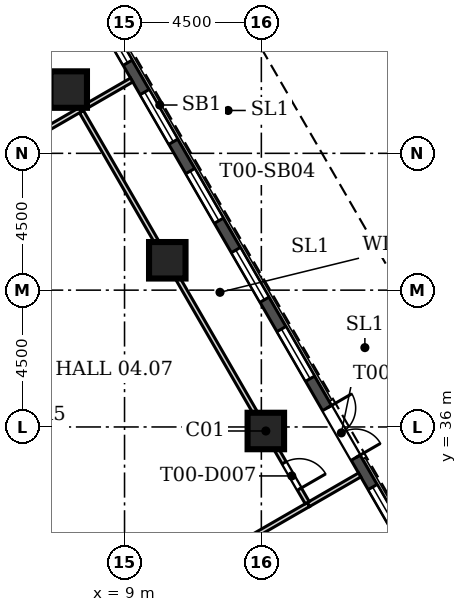
"""IFC4 building model, lengths in metres.
Left out: names, types, materials, properties, quantities, classifications, styles, units other than length and angle.
Written with IfcOpenShell. Run it as: python <this file> out.ifc"""

import sys

from ifc_helpers import new_model, si_unit, direction, frame, frame_2d, origin, origin_2d, place, context, subcontext, project, spatial, rectangle, hollow_rectangle, extrude, element, fill, save


model = new_model("IFC4")
c1 = context("Model", 3, precision=1e-05, world=origin(), true_north=direction((0.0, 1.0)))
c2 = subcontext(c1, "Body", "Model", "MODEL_VIEW")
j1 = project(units=[si_unit("LENGTHUNIT", "METRE"), si_unit("PLANEANGLEUNIT", "RADIAN")], contexts=[c1])
p1 = place(None, origin())
s1 = spatial("IfcSite", under=j1, at=p1, CompositionType="ELEMENT")
p2 = place(p1, origin())
s2 = spatial("IfcBuilding", under=s1, at=p2, CompositionType="ELEMENT")
p3 = place(p2, frame((0.0, 0.0, 25.0)))
s3 = spatial("IfcBuildingStorey", under=s2, at=p3, CompositionType="ELEMENT", Elevation=25.0)
for number, where, z_axis, x_axis in (
    (1, (13.648, 35.868, 0.0), (0.0, 0.0, 1.0), (1.0, 0.0, 0.0)),
    (2, (10.406, 41.482, 0.0), (0.0, 0.0, 1.0), (1.0, 0.0, 0.0)),
    (3, (7.164, 47.097, 0.0), (0.0, 0.0, 1.0), (1.0, 0.0, 0.0)),
):
    element("IfcColumn", number, at=place(p3, frame(where, z_axis=z_axis, x_axis=x_axis)), inside=s3, PredefinedType="COLUMN", context=c2, shape_type="SweptSolid", body=[
        extrude(rectangle(XDim=1.2, YDim=1.2, at=origin_2d()), origin(), (0.0, 0.0, 1.0), 4.5),
    ])
p4 = place(p3, frame((32.353, 7.709, 0.0), z_axis=(0.0, 0.0, 1.0), x_axis=(-0.500000836325, 0.866024920931, 0.0)))
e4 = element("IfcWall", 4, at=p4, inside=s3, PredefinedType="SOLIDWALL", context=c2, shape_type="SweptSolid", body=[
    extrude(rectangle(XDim=56.0, YDim=0.34, at=frame_2d((28.0, 0.0))), origin(), (0.0, 0.0, 1.0), 4.2),
])
p5 = place(p4, frame((1.5, 0.0, 0.9)))
e5 = element("IfcOpeningElement", 5, at=p5, cuts=e4, PredefinedType="OPENING", context=c2, shape_type="SweptSolid", body=[
    extrude(rectangle(XDim=1.885, YDim=3.0, at=frame_2d((0.942, 1.5))), frame((0.0, 0.18, 0.0), z_axis=(0.0, -1.0, 0.0), x_axis=(1.0, 0.0, 0.0)), (0.0, 0.0, 1.0), 0.36),
])
p6 = place(p4, frame((4.5, 0.0, 0.9)))
e6 = element("IfcOpeningElement", 6, at=p6, cuts=e4, PredefinedType="OPENING", context=c2, shape_type="SweptSolid", body=[
    extrude(rectangle(XDim=1.885, YDim=3.0, at=frame_2d((0.942, 1.5))), frame((0.0, 0.18, 0.0), z_axis=(0.0, -1.0, 0.0), x_axis=(1.0, 0.0, 0.0)), (0.0, 0.0, 1.0), 0.36),
])
p7 = place(p4, frame((7.5, 0.0, 0.9)))
e7 = element("IfcOpeningElement", 7, at=p7, cuts=e4, PredefinedType="OPENING", context=c2, shape_type="SweptSolid", body=[
    extrude(rectangle(XDim=1.885, YDim=3.0, at=frame_2d((0.942, 1.5))), frame((0.0, 0.18, 0.0), z_axis=(0.0, -1.0, 0.0), x_axis=(1.0, 0.0, 0.0)), (0.0, 0.0, 1.0), 0.36),
])
p8 = place(p4, frame((10.5, 0.0, 0.9)))
e8 = element("IfcOpeningElement", 8, at=p8, cuts=e4, PredefinedType="OPENING", context=c2, shape_type="SweptSolid", body=[
    extrude(rectangle(XDim=1.885, YDim=3.0, at=frame_2d((0.942, 1.5))), frame((0.0, 0.18, 0.0), z_axis=(0.0, -1.0, 0.0), x_axis=(1.0, 0.0, 0.0)), (0.0, 0.0, 1.0), 0.36),
])
p9 = place(p4, frame((13.5, 0.0, 0.9)))
e9 = element("IfcOpeningElement", 9, at=p9, cuts=e4, PredefinedType="OPENING", context=c2, shape_type="SweptSolid", body=[
    extrude(rectangle(XDim=1.885, YDim=3.0, at=frame_2d((0.942, 1.5))), frame((0.0, 0.18, 0.0), z_axis=(0.0, -1.0, 0.0), x_axis=(1.0, 0.0, 0.0)), (0.0, 0.0, 1.0), 0.36),
])
p10 = place(p4, frame((16.5, 0.0, 0.9)))
e10 = element("IfcOpeningElement", 10, at=p10, cuts=e4, PredefinedType="OPENING", context=c2, shape_type="SweptSolid", body=[
    extrude(rectangle(XDim=1.885, YDim=3.0, at=frame_2d((0.942, 1.5))), frame((0.0, 0.18, 0.0), z_axis=(0.0, -1.0, 0.0), x_axis=(1.0, 0.0, 0.0)), (0.0, 0.0, 1.0), 0.36),
])
p11 = place(p4, frame((19.5, 0.0, 0.9)))
e11 = element("IfcOpeningElement", 11, at=p11, cuts=e4, PredefinedType="OPENING", context=c2, shape_type="SweptSolid", body=[
    extrude(rectangle(XDim=1.885, YDim=3.0, at=frame_2d((0.942, 1.5))), frame((0.0, 0.18, 0.0), z_axis=(0.0, -1.0, 0.0), x_axis=(1.0, 0.0, 0.0)), (0.0, 0.0, 1.0), 0.36),
])
p12 = place(p4, frame((22.5, 0.0, 0.9)))
e12 = element("IfcOpeningElement", 12, at=p12, cuts=e4, PredefinedType="OPENING", context=c2, shape_type="SweptSolid", body=[
    extrude(rectangle(XDim=1.885, YDim=3.0, at=frame_2d((0.942, 1.5))), frame((0.0, 0.18, 0.0), z_axis=(0.0, -1.0, 0.0), x_axis=(1.0, 0.0, 0.0)), (0.0, 0.0, 1.0), 0.36),
])
p13 = place(p4, frame((25.5, 0.0, 0.9)))
e13 = element("IfcOpeningElement", 13, at=p13, cuts=e4, PredefinedType="OPENING", context=c2, shape_type="SweptSolid", body=[
    extrude(rectangle(XDim=1.885, YDim=3.0, at=frame_2d((0.942, 1.5))), frame((0.0, 0.18, 0.0), z_axis=(0.0, -1.0, 0.0), x_axis=(1.0, 0.0, 0.0)), (0.0, 0.0, 1.0), 0.36),
])
p14 = place(p4, frame((28.5, 0.0, 0.9)))
e14 = element("IfcOpeningElement", 14, at=p14, cuts=e4, PredefinedType="OPENING", context=c2, shape_type="SweptSolid", body=[
    extrude(rectangle(XDim=1.885, YDim=3.0, at=frame_2d((0.942, 1.5))), frame((0.0, 0.18, 0.0), z_axis=(0.0, -1.0, 0.0), x_axis=(1.0, 0.0, 0.0)), (0.0, 0.0, 1.0), 0.36),
])
p15 = place(p4, frame((31.5, 0.0, 0.0)))
e15 = element("IfcOpeningElement", 15, at=p15, cuts=e4, PredefinedType="OPENING", context=c2, shape_type="SweptSolid", body=[
    extrude(rectangle(XDim=1.885, YDim=2.6, at=frame_2d((0.942, 1.3))), frame((0.0, 0.18, 0.0), z_axis=(0.0, -1.0, 0.0), x_axis=(1.0, 0.0, 0.0)), (0.0, 0.0, 1.0), 0.36),
])
p16 = place(p4, frame((34.5, 0.0, 0.9)))
e16 = element("IfcOpeningElement", 16, at=p16, cuts=e4, PredefinedType="OPENING", context=c2, shape_type="SweptSolid", body=[
    extrude(rectangle(XDim=1.885, YDim=3.0, at=frame_2d((0.942, 1.5))), frame((0.0, 0.18, 0.0), z_axis=(0.0, -1.0, 0.0), x_axis=(1.0, 0.0, 0.0)), (0.0, 0.0, 1.0), 0.36),
])
p17 = place(p4, frame((37.5, 0.0, 0.9)))
e17 = element("IfcOpeningElement", 17, at=p17, cuts=e4, PredefinedType="OPENING", context=c2, shape_type="SweptSolid", body=[
    extrude(rectangle(XDim=1.885, YDim=3.0, at=frame_2d((0.942, 1.5))), frame((0.0, 0.18, 0.0), z_axis=(0.0, -1.0, 0.0), x_axis=(1.0, 0.0, 0.0)), (0.0, 0.0, 1.0), 0.36),
])
p18 = place(p4, frame((40.5, 0.0, 0.9)))
e18 = element("IfcOpeningElement", 18, at=p18, cuts=e4, PredefinedType="OPENING", context=c2, shape_type="SweptSolid", body=[
    extrude(rectangle(XDim=1.885, YDim=3.0, at=frame_2d((0.942, 1.5))), frame((0.0, 0.18, 0.0), z_axis=(0.0, -1.0, 0.0), x_axis=(1.0, 0.0, 0.0)), (0.0, 0.0, 1.0), 0.36),
])
p19 = place(p4, frame((43.5, 0.0, 0.9)))
e19 = element("IfcOpeningElement", 19, at=p19, cuts=e4, PredefinedType="OPENING", context=c2, shape_type="SweptSolid", body=[
    extrude(rectangle(XDim=1.885, YDim=3.0, at=frame_2d((0.942, 1.5))), frame((0.0, 0.18, 0.0), z_axis=(0.0, -1.0, 0.0), x_axis=(1.0, 0.0, 0.0)), (0.0, 0.0, 1.0), 0.36),
])
p20 = place(p4, frame((46.5, 0.0, 0.9)))
e20 = element("IfcOpeningElement", 20, at=p20, cuts=e4, PredefinedType="OPENING", context=c2, shape_type="SweptSolid", body=[
    extrude(rectangle(XDim=1.885, YDim=3.0, at=frame_2d((0.942, 1.5))), frame((0.0, 0.18, 0.0), z_axis=(0.0, -1.0, 0.0), x_axis=(1.0, 0.0, 0.0)), (0.0, 0.0, 1.0), 0.36),
])
p21 = place(p4, frame((49.5, 0.0, 0.9)))
e21 = element("IfcOpeningElement", 21, at=p21, cuts=e4, PredefinedType="OPENING", context=c2, shape_type="SweptSolid", body=[
    extrude(rectangle(XDim=1.885, YDim=3.0, at=frame_2d((0.942, 1.5))), frame((0.0, 0.18, 0.0), z_axis=(0.0, -1.0, 0.0), x_axis=(1.0, 0.0, 0.0)), (0.0, 0.0, 1.0), 0.36),
])
p22 = place(p4, frame((52.5, 0.0, 0.9)))
e22 = element("IfcOpeningElement", 22, at=p22, cuts=e4, PredefinedType="OPENING", context=c2, shape_type="SweptSolid", body=[
    extrude(rectangle(XDim=1.885, YDim=3.0, at=frame_2d((0.942, 1.5))), frame((0.0, 0.18, 0.0), z_axis=(0.0, -1.0, 0.0), x_axis=(1.0, 0.0, 0.0)), (0.0, 0.0, 1.0), 0.36),
])
p23 = place(p2, frame((0.0, 0.0, 20.0)))
s4 = spatial("IfcBuildingStorey", under=s2, at=p23, CompositionType="ELEMENT", Elevation=20.0)
for number, where, z_axis, x_axis in (
    (23, (16.88, 42.042, 5.0), (0.0, 0.0, 1.0), (1.0, 0.0, 0.0)),
    (24, (14.18, 46.718, 5.0), (0.0, 0.0, 1.0), (1.0, 0.0, 0.0)),
):
    element("IfcColumn", number, at=place(p23, frame(where, z_axis=z_axis, x_axis=x_axis)), inside=s4, PredefinedType="COLUMN", context=c2, shape_type="SweptSolid", body=[
        extrude(hollow_rectangle(XDim=0.25, YDim=0.25, WallThickness=0.012, at=origin_2d()), origin(), (0.0, 0.0, 1.0), 3.6),
    ])
p24 = place(p3, frame((15.046, 33.446, 0.0), z_axis=(0.0, 0.0, 1.0), x_axis=(0.866054235095, 0.49995005938, 0.0)))
e25 = element("IfcWall", 25, at=p24, inside=s3, PredefinedType="PARTITIONING", context=c2, shape_type="SweptSolid", body=[
    extrude(rectangle(XDim=1.95, YDim=0.15, at=frame_2d((0.975, 0.0))), origin(), (0.0, 0.0, 1.0), 4.2),
])
p25 = place(p3, frame((9.373, 30.171, 0.0), z_axis=(0.0, 0.0, 1.0), x_axis=(0.866021102686, 0.500007449647, 0.0)))
e26 = element("IfcWall", 26, at=p25, inside=s3, PredefinedType="PARTITIONING", context=c2, shape_type="SweptSolid", body=[
    extrude(rectangle(XDim=6.55, YDim=0.15, at=frame_2d((3.275, 0.0))), origin(), (0.0, 0.0, 1.0), 4.2),
])
p26 = place(p3, frame((7.764, 46.563, 0.0), z_axis=(0.0, 0.0, 1.0), x_axis=(0.866039477586, 0.499975622669, 0.0)))
e27 = element("IfcWall", 27, at=p26, inside=s3, PredefinedType="PARTITIONING", context=c2, shape_type="SweptSolid", body=[
    extrude(rectangle(XDim=1.697, YDim=0.15, at=frame_2d((0.849, 0.0))), origin(), (0.0, 0.0, 1.0), 4.2),
])
p27 = place(p3, frame((15.008, 33.511, 0.0), z_axis=(0.0, 0.0, 1.0), x_axis=(-0.500048947491, 0.865997142093, 0.0)))
e28 = element("IfcWall", 28, at=p27, inside=s3, PredefinedType="PARTITIONING", context=c2, shape_type="SweptSolid", body=[
    extrude(rectangle(XDim=2.028, YDim=0.15, at=frame_2d((1.014, 0.0))), origin(), (0.0, 0.0, 1.0), 3.4),
])
p28 = place(p27, frame((0.514, 0.0, 0.0)))
e29 = element("IfcOpeningElement", 29, at=p28, cuts=e28, PredefinedType="OPENING", context=c2, shape_type="SweptSolid", body=[
    extrude(rectangle(XDim=1.0, YDim=2.1, at=frame_2d((0.5, 1.05))), frame((0.0, 0.085, 0.0), z_axis=(0.0, -1.0, 0.0), x_axis=(1.0, 0.0, 0.0)), (0.0, 0.0, 1.0), 0.17),
])
p29 = place(p3, frame((13.301, 36.468, 0.0), z_axis=(0.0, 0.0, 1.0), x_axis=(-0.499991921166, 0.866030068051, 0.0)))
e30 = element("IfcWall", 30, at=p29, inside=s3, PredefinedType="PARTITIONING", context=c2, shape_type="SweptSolid", body=[
    extrude(rectangle(XDim=5.098, YDim=0.15, at=frame_2d((2.549, 0.0))), origin(), (0.0, 0.0, 1.0), 3.4),
])
p30 = place(p3, frame((10.06, 42.082, 0.0), z_axis=(0.0, 0.0, 1.0), x_axis=(-0.500019708872, 0.866014024563, 0.0)))
e31 = element("IfcWall", 31, at=p30, inside=s3, PredefinedType="PARTITIONING", context=c2, shape_type="SweptSolid", body=[
    extrude(rectangle(XDim=4.953, YDim=0.15, at=frame_2d((2.477, 0.0))), origin(), (0.0, 0.0, 1.0), 3.4),
])
p31 = place(p3, frame((7.546, 46.437, 0.0), z_axis=(0.0, 0.0, 1.0), x_axis=(-0.866037534292, -0.499978988757, 0.0)))
e32 = element("IfcWall", 32, at=p31, inside=s3, PredefinedType="PARTITIONING", context=c2, shape_type="SweptSolid", body=[
    extrude(rectangle(XDim=6.975, YDim=0.15, at=frame_2d((3.487, 0.0))), origin(), (0.0, 0.0, 1.0), 4.2),
])
p32 = place(p31, frame((2.988, 0.0, 0.0)))
e33 = element("IfcOpeningElement", 33, at=p32, cuts=e32, PredefinedType="OPENING", context=c2, shape_type="SweptSolid", body=[
    extrude(rectangle(XDim=1.0, YDim=2.1, at=frame_2d((0.5, 1.05))), frame((0.0, 0.085, 0.0), z_axis=(0.0, -1.0, 0.0), x_axis=(1.0, 0.0, 0.0)), (0.0, 0.0, 1.0), 0.17),
])
p33 = place(p14, origin())
e34 = element("IfcWindow", 34, at=p33, inside=s3, PartitioningType="SINGLE_PANEL", PredefinedType="WINDOW", context=c2, shape_type="SweptSolid", body=[
    extrude(rectangle(XDim=1.885, YDim=3.0, at=frame_2d((0.942, 1.5))), frame((0.0, 0.11, 0.0), z_axis=(0.0, -1.0, 0.0), x_axis=(1.0, 0.0, 0.0)), (0.0, 0.0, 1.0), 0.06),
])
fill(e14, e34)
p34 = place(p15, frame((1.885, 0.0, 0.0), z_axis=(0.0, 0.0, 1.0), x_axis=(-1.0, 0.0, 0.0)))
e35 = element("IfcDoor", 35, at=p34, inside=s3, OperationType="DOUBLE_DOOR_SINGLE_SWING", PredefinedType="DOOR", context=c2, shape_type="SweptSolid", body=[
    extrude(rectangle(XDim=1.885, YDim=2.6, at=frame_2d((0.942, 1.3))), frame((0.0, 0.025, 0.0), z_axis=(0.0, -1.0, 0.0), x_axis=(1.0, 0.0, 0.0)), (0.0, 0.0, 1.0), 0.05),
])
fill(e15, e35)
p35 = place(p16, origin())
e36 = element("IfcWindow", 36, at=p35, inside=s3, PartitioningType="SINGLE_PANEL", PredefinedType="WINDOW", context=c2, shape_type="SweptSolid", body=[
    extrude(rectangle(XDim=1.885, YDim=3.0, at=frame_2d((0.942, 1.5))), frame((0.0, 0.11, 0.0), z_axis=(0.0, -1.0, 0.0), x_axis=(1.0, 0.0, 0.0)), (0.0, 0.0, 1.0), 0.06),
])
fill(e16, e36)
p36 = place(p17, origin())
e37 = element("IfcWindow", 37, at=p36, inside=s3, PartitioningType="SINGLE_PANEL", PredefinedType="WINDOW", context=c2, shape_type="SweptSolid", body=[
    extrude(rectangle(XDim=1.885, YDim=3.0, at=frame_2d((0.942, 1.5))), frame((0.0, 0.11, 0.0), z_axis=(0.0, -1.0, 0.0), x_axis=(1.0, 0.0, 0.0)), (0.0, 0.0, 1.0), 0.06),
])
fill(e17, e37)
p37 = place(p18, origin())
e38 = element("IfcWindow", 38, at=p37, inside=s3, PartitioningType="SINGLE_PANEL", PredefinedType="WINDOW", context=c2, shape_type="SweptSolid", body=[
    extrude(rectangle(XDim=1.885, YDim=3.0, at=frame_2d((0.942, 1.5))), frame((0.0, 0.11, 0.0), z_axis=(0.0, -1.0, 0.0), x_axis=(1.0, 0.0, 0.0)), (0.0, 0.0, 1.0), 0.06),
])
fill(e18, e38)
p38 = place(p19, origin())
e39 = element("IfcWindow", 39, at=p38, inside=s3, PartitioningType="SINGLE_PANEL", PredefinedType="WINDOW", context=c2, shape_type="SweptSolid", body=[
    extrude(rectangle(XDim=1.885, YDim=3.0, at=frame_2d((0.942, 1.5))), frame((0.0, 0.11, 0.0), z_axis=(0.0, -1.0, 0.0), x_axis=(1.0, 0.0, 0.0)), (0.0, 0.0, 1.0), 0.06),
])
fill(e19, e39)
p39 = place(p20, origin())
e40 = element("IfcWindow", 40, at=p39, inside=s3, PartitioningType="SINGLE_PANEL", PredefinedType="WINDOW", context=c2, shape_type="SweptSolid", body=[
    extrude(rectangle(XDim=1.885, YDim=3.0, at=frame_2d((0.942, 1.5))), frame((0.0, 0.11, 0.0), z_axis=(0.0, -1.0, 0.0), x_axis=(1.0, 0.0, 0.0)), (0.0, 0.0, 1.0), 0.06),
])
fill(e20, e40)
p40 = place(p3, frame((0.0, 0.0, 4.0)))
p41 = place(p40, frame((16.906, 38.61, 0.0)))
p42 = place(p41, frame((0.0, 0.0, 0.15)))
e41 = element("IfcWindow", 41, at=p42, inside=s3, PartitioningType="SINGLE_PANEL", PredefinedType="SKYLIGHT", context=c2, shape_type="SweptSolid", body=[
    extrude(rectangle(XDim=1.2, YDim=2.4, at=origin_2d()), origin(), (0.0, 0.0, 1.0), 0.05),
])
p43 = place(p40, frame((15.105, 41.91, 0.0)))
p44 = place(p43, frame((0.0, 0.0, 0.15)))
e42 = element("IfcWindow", 42, at=p44, inside=s3, PartitioningType="SINGLE_PANEL", PredefinedType="SKYLIGHT", context=c2, shape_type="SweptSolid", body=[
    extrude(rectangle(XDim=1.2, YDim=2.4, at=origin_2d()), origin(), (0.0, 0.0, 1.0), 0.05),
])
p45 = place(p40, frame((12.406, 46.41, 0.0)))
p46 = place(p45, frame((0.0, 0.0, 0.15)))
e43 = element("IfcWindow", 43, at=p46, inside=s3, PartitioningType="SINGLE_PANEL", PredefinedType="SKYLIGHT", context=c2, shape_type="SweptSolid", body=[
    extrude(rectangle(XDim=1.2, YDim=2.4, at=origin_2d()), origin(), (0.0, 0.0, 1.0), 0.05),
])
p47 = place(p28, frame((1.0, 0.0, 0.0), z_axis=(0.0, 0.0, 1.0), x_axis=(-1.0, 0.0, 0.0)))
e44 = element("IfcDoor", 44, at=p47, inside=s3, OperationType="SINGLE_SWING_RIGHT", PredefinedType="DOOR", context=c2, shape_type="SweptSolid", body=[
    extrude(rectangle(XDim=1.0, YDim=2.1, at=frame_2d((0.5, 1.05))), frame((0.0, 0.025, 0.0), z_axis=(0.0, -1.0, 0.0), x_axis=(1.0, 0.0, 0.0)), (0.0, 0.0, 1.0), 0.05),
])
fill(e29, e44)
save(model, sys.argv[1])
